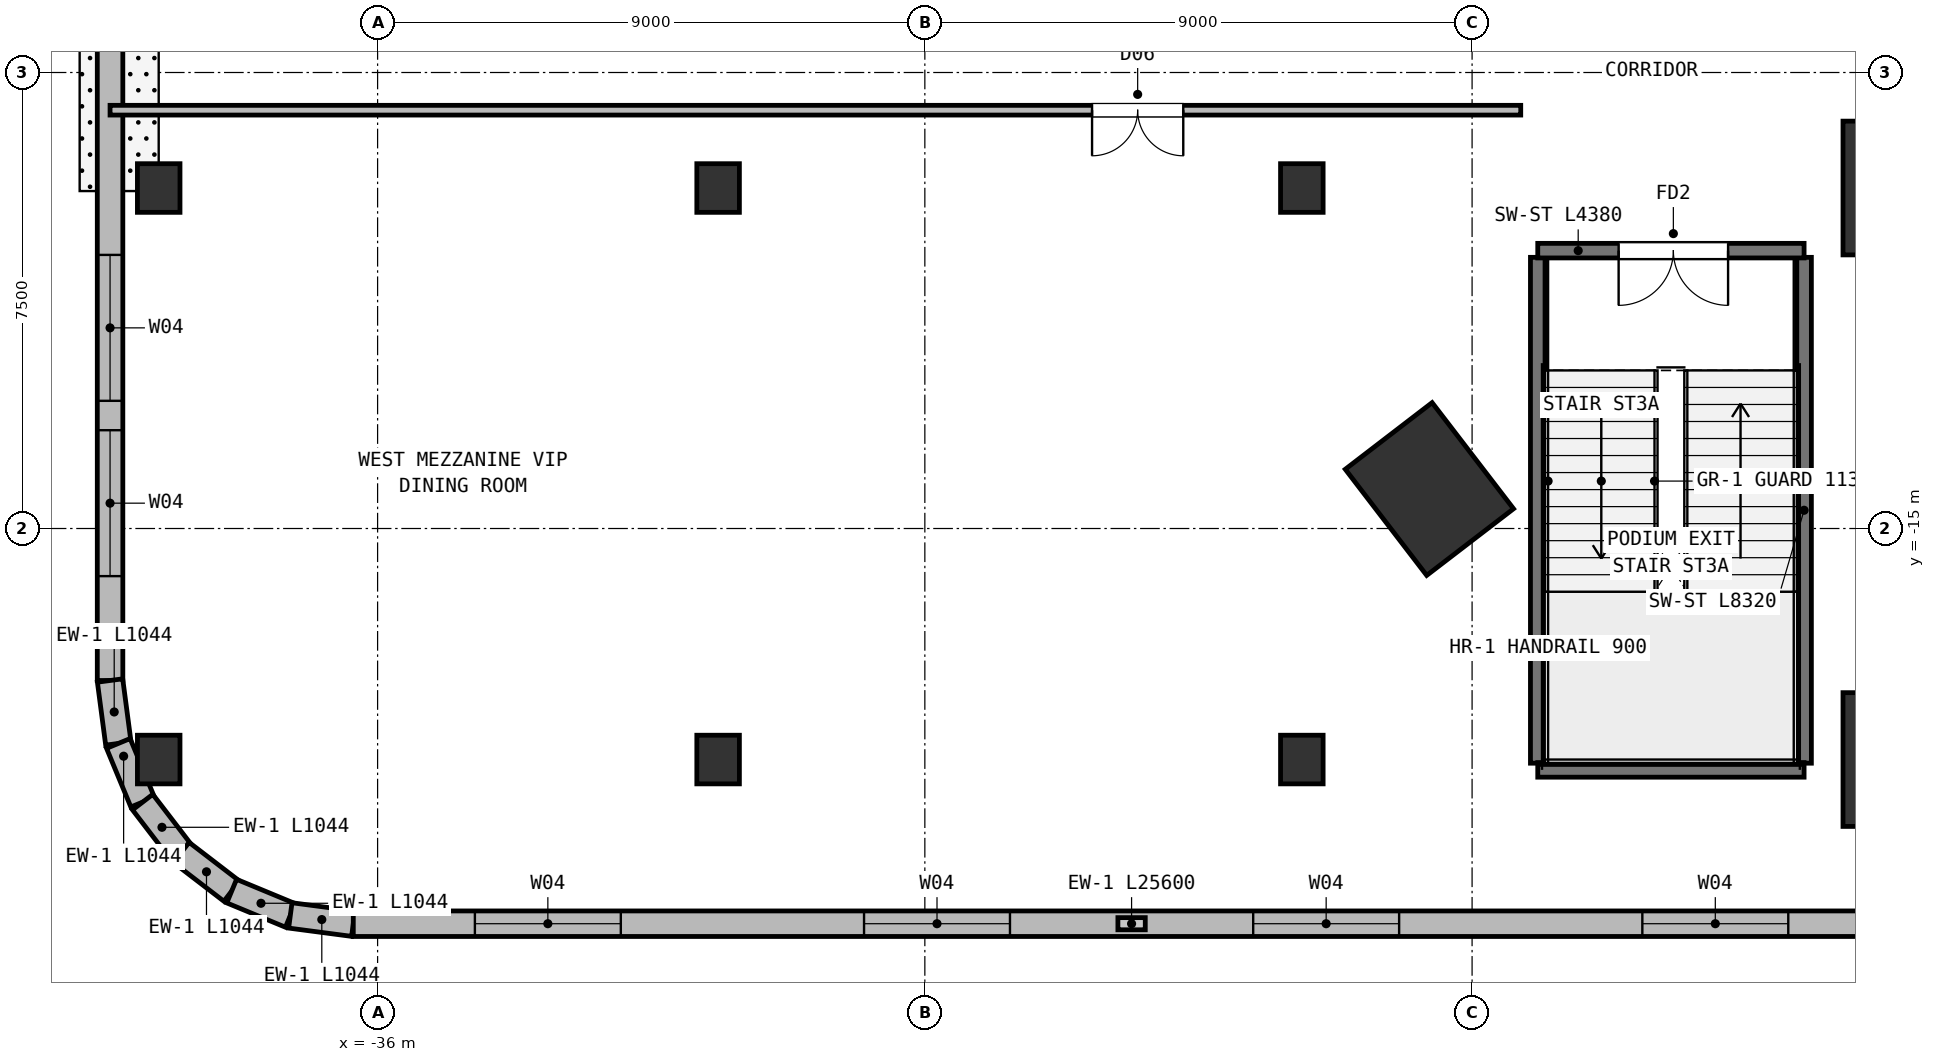
"""IFC4 building model, lengths in metres.
Left out: names, types, materials, properties, quantities, classifications, styles, units other than length and angle.
Written with IfcOpenShell. Run it as: python <this file> out.ifc"""

import sys

from ifc_helpers import new_model, si_unit, direction, frame, frame_2d, origin, origin_2d, place, context, subcontext, project, spatial, rectangle, extrude, element, fill, save


model = new_model("IFC4")
c1 = context("Model", 3, precision=1e-05, world=origin(), true_north=direction((0.0, 1.0)))
c2 = subcontext(c1, "Body", "Model", "MODEL_VIEW")
j1 = project(units=[si_unit("LENGTHUNIT", "METRE"), si_unit("PLANEANGLEUNIT", "RADIAN")], contexts=[c1])
p1 = place(None, origin())
s1 = spatial("IfcSite", under=j1, at=p1, CompositionType="ELEMENT")
p2 = place(p1, origin())
s2 = spatial("IfcBuilding", under=s1, at=p2, CompositionType="ELEMENT")
p3 = place(p2, frame((0.0, 0.0, 6.0)))
s3 = spatial("IfcBuildingStorey", under=s2, at=p3, CompositionType="ELEMENT", Elevation=6.0)
p4 = place(p3, frame((-18.702, -14.351, 0.0), z_axis=(0.0, 0.0, 1.0), x_axis=(0.793353340291, 0.608761429009, 0.0)))
e1 = element("IfcColumn", 1, at=p4, inside=s3, PredefinedType="COLUMN", context=c2, shape_type="SweptSolid", body=[
    extrude(rectangle(XDim=1.8, YDim=2.2, at=origin_2d()), origin(), (0.0, 0.0, 1.0), 5.0),
])
for number, where, z_axis, x_axis in (
    (2, (-39.6, -18.8, 0.0), (0.0, 0.0, 1.0), (1.0, 0.0, 0.0)),
    (3, (-39.6, -9.4, 0.0), (0.0, 0.0, 1.0), (1.0, 0.0, 0.0)),
    (4, (-30.4, -18.8, 0.0), (0.0, 0.0, 1.0), (1.0, 0.0, 0.0)),
    (5, (-30.4, -9.4, 0.0), (0.0, 0.0, 1.0), (1.0, 0.0, 0.0)),
    (6, (-20.8, -18.8, 0.0), (0.0, 0.0, 1.0), (1.0, 0.0, 0.0)),
    (7, (-20.8, -9.4, 0.0), (0.0, 0.0, 1.0), (1.0, 0.0, 0.0)),
):
    element("IfcColumn", number, at=place(p3, frame(where, z_axis=z_axis, x_axis=x_axis)), inside=s3, PredefinedType="COLUMN", context=c2, shape_type="SweptSolid", body=[
        extrude(rectangle(XDim=0.7, YDim=0.8, at=origin_2d()), origin(), (0.0, 0.0, 1.0), 5.0),
    ])
for number, where, z_axis, x_axis in (
    (8, (-11.0, -18.8, 0.0), (0.0, 0.0, 1.0), (1.0, 0.0, 0.0)),
    (9, (-11.0, -9.4, 0.0), (0.0, 0.0, 1.0), (1.0, 0.0, 0.0)),
):
    element("IfcColumn", number, at=place(p3, frame(where, z_axis=z_axis, x_axis=x_axis)), inside=s3, PredefinedType="COLUMN", context=c2, shape_type="SweptSolid", body=[
        extrude(rectangle(XDim=1.8, YDim=2.2, at=origin_2d()), origin(), (0.0, 0.0, 1.0), 5.0),
    ])
p5 = place(p3, frame((-40.4, -17.5, 0.0), z_axis=(0.0, 0.0, 1.0), x_axis=(0.0, 1.0, 0.0)))
e10 = element("IfcWall", 10, at=p5, inside=s3, PredefinedType="SOLIDWALL", context=c2, shape_type="SweptSolid", body=[
    extrude(rectangle(XDim=35.0, YDim=0.42, at=frame_2d((17.5, 0.0))), origin(), (0.0, 0.0, 1.0), 4.72),
])
p6 = place(p5, frame((1.717, 0.0, 0.95)))
e11 = element("IfcOpeningElement", 11, at=p6, cuts=e10, PredefinedType="OPENING", context=c2, shape_type="SweptSolid", body=[
    extrude(rectangle(XDim=2.4, YDim=2.6, at=frame_2d((1.2, 1.3))), frame((0.0, 0.22, 0.0), z_axis=(0.0, -1.0, 0.0), x_axis=(1.0, 0.0, 0.0)), (0.0, 0.0, 1.0), 0.44),
])
p7 = place(p5, frame((4.6, 0.0, 0.95)))
e12 = element("IfcOpeningElement", 12, at=p7, cuts=e10, PredefinedType="OPENING", context=c2, shape_type="SweptSolid", body=[
    extrude(rectangle(XDim=2.4, YDim=2.6, at=frame_2d((1.2, 1.3))), frame((0.0, 0.22, 0.0), z_axis=(0.0, -1.0, 0.0), x_axis=(1.0, 0.0, 0.0)), (0.0, 0.0, 1.0), 0.44),
])
p8 = place(p5, frame((13.383, 0.0, 0.95)))
e13 = element("IfcOpeningElement", 13, at=p8, cuts=e10, PredefinedType="OPENING", context=c2, shape_type="SweptSolid", body=[
    extrude(rectangle(XDim=2.4, YDim=2.6, at=frame_2d((1.2, 1.3))), frame((0.0, 0.22, 0.0), z_axis=(0.0, -1.0, 0.0), x_axis=(1.0, 0.0, 0.0)), (0.0, 0.0, 1.0), 0.44),
])
p9 = place(p5, frame((19.217, 0.0, 0.95)))
e14 = element("IfcOpeningElement", 14, at=p9, cuts=e10, PredefinedType="OPENING", context=c2, shape_type="SweptSolid", body=[
    extrude(rectangle(XDim=2.4, YDim=2.6, at=frame_2d((1.2, 1.3))), frame((0.0, 0.22, 0.0), z_axis=(0.0, -1.0, 0.0), x_axis=(1.0, 0.0, 0.0)), (0.0, 0.0, 1.0), 0.44),
])
p10 = place(p5, frame((28.0, 0.0, 0.95)))
e15 = element("IfcOpeningElement", 15, at=p10, cuts=e10, PredefinedType="OPENING", context=c2, shape_type="SweptSolid", body=[
    extrude(rectangle(XDim=2.4, YDim=2.6, at=frame_2d((1.2, 1.3))), frame((0.0, 0.22, 0.0), z_axis=(0.0, -1.0, 0.0), x_axis=(1.0, 0.0, 0.0)), (0.0, 0.0, 1.0), 0.44),
])
p11 = place(p5, frame((30.883, 0.0, 0.95)))
e16 = element("IfcOpeningElement", 16, at=p11, cuts=e10, PredefinedType="OPENING", context=c2, shape_type="SweptSolid", body=[
    extrude(rectangle(XDim=2.4, YDim=2.6, at=frame_2d((1.2, 1.3))), frame((0.0, 0.22, 0.0), z_axis=(0.0, -1.0, 0.0), x_axis=(1.0, 0.0, 0.0)), (0.0, 0.0, 1.0), 0.44),
])
p12 = place(p3, frame((-40.264, -18.535, 0.0), z_axis=(0.0, 0.0, 1.0), x_axis=(-0.130448465198, 0.991455091231, 0.0)))
e17 = element("IfcWall", 17, at=p12, inside=s3, PredefinedType="SOLIDWALL", context=c2, shape_type="SweptSolid", body=[
    extrude(rectangle(XDim=1.044, YDim=0.42, at=frame_2d((0.522, 0.0))), origin(), (0.0, 0.0, 1.0), 4.72),
])
p13 = place(p3, frame((-39.864, -19.5, 0.0), z_axis=(0.0, 0.0, 1.0), x_axis=(-0.382771688877, 0.923842970528, 0.0)))
e18 = element("IfcWall", 18, at=p13, inside=s3, PredefinedType="SOLIDWALL", context=c2, shape_type="SweptSolid", body=[
    extrude(rectangle(XDim=1.044, YDim=0.42, at=frame_2d((0.522, 0.0))), origin(), (0.0, 0.0, 1.0), 4.72),
])
p14 = place(p3, frame((-39.229, -20.328, 0.0), z_axis=(0.0, 0.0, 1.0), x_axis=(-0.608681879412, 0.793414374508, 0.0)))
e19 = element("IfcWall", 19, at=p14, inside=s3, PredefinedType="SOLIDWALL", context=c2, shape_type="SweptSolid", body=[
    extrude(rectangle(XDim=1.044, YDim=0.42, at=frame_2d((0.522, 0.0))), origin(), (0.0, 0.0, 1.0), 4.72),
])
p15 = place(p3, frame((-38.4, -20.964, 0.0), z_axis=(0.0, 0.0, 1.0), x_axis=(-0.793388088797, 0.608716141198, 0.0)))
e20 = element("IfcWall", 20, at=p15, inside=s3, PredefinedType="SOLIDWALL", context=c2, shape_type="SweptSolid", body=[
    extrude(rectangle(XDim=1.044, YDim=0.42, at=frame_2d((0.522, 0.0))), origin(), (0.0, 0.0, 1.0), 4.72),
])
p16 = place(p3, frame((-37.435, -21.364, 0.0), z_axis=(0.0, 0.0, 1.0), x_axis=(-0.923842970528, 0.382771688877, 0.0)))
e21 = element("IfcWall", 21, at=p16, inside=s3, PredefinedType="SOLIDWALL", context=c2, shape_type="SweptSolid", body=[
    extrude(rectangle(XDim=1.044, YDim=0.42, at=frame_2d((0.522, 0.0))), origin(), (0.0, 0.0, 1.0), 4.72),
])
p17 = place(p3, frame((-36.4, -21.5, 0.0), z_axis=(0.0, 0.0, 1.0), x_axis=(-0.991455091231, 0.130448465198, 0.0)))
e22 = element("IfcWall", 22, at=p17, inside=s3, PredefinedType="SOLIDWALL", context=c2, shape_type="SweptSolid", body=[
    extrude(rectangle(XDim=1.044, YDim=0.42, at=frame_2d((0.522, 0.0))), origin(), (0.0, 0.0, 1.0), 4.72),
])
p18 = place(p3, frame((-10.8, -21.5, 0.0), z_axis=(0.0, 0.0, 1.0), x_axis=(-1.0, 0.0, 0.0)))
e23 = element("IfcWall", 23, at=p18, inside=s3, PredefinedType="SOLIDWALL", context=c2, shape_type="SweptSolid", body=[
    extrude(rectangle(XDim=25.6, YDim=0.42, at=frame_2d((12.8, 0.0))), origin(), (0.0, 0.0, 1.0), 4.72),
])
p19 = place(p18, frame((2.0, 0.0, 0.95)))
e24 = element("IfcOpeningElement", 24, at=p19, cuts=e23, PredefinedType="OPENING", context=c2, shape_type="SweptSolid", body=[
    extrude(rectangle(XDim=2.4, YDim=2.6, at=frame_2d((1.2, 1.3))), frame((0.0, 0.22, 0.0), z_axis=(0.0, -1.0, 0.0), x_axis=(1.0, 0.0, 0.0)), (0.0, 0.0, 1.0), 0.44),
])
p20 = place(p18, frame((8.4, 0.0, 0.95)))
e25 = element("IfcOpeningElement", 25, at=p20, cuts=e23, PredefinedType="OPENING", context=c2, shape_type="SweptSolid", body=[
    extrude(rectangle(XDim=2.4, YDim=2.6, at=frame_2d((1.2, 1.3))), frame((0.0, 0.22, 0.0), z_axis=(0.0, -1.0, 0.0), x_axis=(1.0, 0.0, 0.0)), (0.0, 0.0, 1.0), 0.44),
])
p21 = place(p18, frame((14.8, 0.0, 0.95)))
e26 = element("IfcOpeningElement", 26, at=p21, cuts=e23, PredefinedType="OPENING", context=c2, shape_type="SweptSolid", body=[
    extrude(rectangle(XDim=2.4, YDim=2.6, at=frame_2d((1.2, 1.3))), frame((0.0, 0.22, 0.0), z_axis=(0.0, -1.0, 0.0), x_axis=(1.0, 0.0, 0.0)), (0.0, 0.0, 1.0), 0.44),
])
p22 = place(p18, frame((21.2, 0.0, 0.95)))
e27 = element("IfcOpeningElement", 27, at=p22, cuts=e23, PredefinedType="OPENING", context=c2, shape_type="SweptSolid", body=[
    extrude(rectangle(XDim=2.4, YDim=2.6, at=frame_2d((1.2, 1.3))), frame((0.0, 0.22, 0.0), z_axis=(0.0, -1.0, 0.0), x_axis=(1.0, 0.0, 0.0)), (0.0, 0.0, 1.0), 0.44),
])
for number, where, z_axis, x_axis in (
    (28, (-16.92, -18.86, 0.0), (0.0, 0.0, 1.0), (0.0, 1.0, 0.0)),
    (29, (-12.54, -18.86, 0.0), (0.0, 0.0, 1.0), (0.0, 1.0, 0.0)),
):
    element("IfcWall", number, at=place(p3, frame(where, z_axis=z_axis, x_axis=x_axis)), inside=s3, PredefinedType="SHEAR", context=c2, shape_type="SweptSolid", body=[
        extrude(rectangle(XDim=8.32, YDim=0.24, at=frame_2d((4.16, 0.0))), origin(), (0.0, 0.0, 1.0), 4.72),
    ])
p23 = place(p3, frame((-16.92, -18.97, 0.0), z_axis=(0.0, 0.0, 1.0), x_axis=(1.0, 0.0, 0.0)))
e30 = element("IfcWall", 30, at=p23, inside=s3, PredefinedType="SHEAR", context=c2, shape_type="SweptSolid", body=[
    extrude(rectangle(XDim=4.38, YDim=0.24, at=frame_2d((2.19, 0.0))), origin(), (0.0, 0.0, 1.0), 4.72),
])
p24 = place(p3, frame((-12.54, -10.43, 0.0), z_axis=(0.0, 0.0, 1.0), x_axis=(-1.0, 0.0, 0.0)))
e31 = element("IfcWall", 31, at=p24, inside=s3, PredefinedType="SHEAR", context=c2, shape_type="SweptSolid", body=[
    extrude(rectangle(XDim=4.38, YDim=0.24, at=frame_2d((2.19, 0.0))), origin(), (0.0, 0.0, 1.0), 4.72),
])
p25 = place(p24, frame((1.25, 0.0, 0.0)))
e32 = element("IfcOpeningElement", 32, at=p25, cuts=e31, PredefinedType="OPENING", context=c2, shape_type="SweptSolid", body=[
    extrude(rectangle(XDim=1.8, YDim=2.2, at=frame_2d((0.9, 1.1))), frame((0.0, 0.13, 0.0), z_axis=(0.0, -1.0, 0.0), x_axis=(1.0, 0.0, 0.0)), (0.0, 0.0, 1.0), 0.26),
])
p26 = place(p3, frame((-17.2, -8.12, 0.0), z_axis=(0.0, 0.0, 1.0), x_axis=(-1.0, 0.0, 0.0)))
e33 = element("IfcWall", 33, at=p26, inside=s3, PredefinedType="PARTITIONING", context=c2, shape_type="SweptSolid", body=[
    extrude(rectangle(XDim=23.2, YDim=0.16, at=frame_2d((11.6, 0.0))), origin(), (0.0, 0.0, 1.0), 4.72),
])
p27 = place(p26, frame((5.55, 0.0, 0.0)))
e34 = element("IfcOpeningElement", 34, at=p27, cuts=e33, PredefinedType="OPENING", context=c2, shape_type="SweptSolid", body=[
    extrude(rectangle(XDim=1.5, YDim=2.2, at=frame_2d((0.75, 1.1))), frame((0.0, 0.09, 0.0), z_axis=(0.0, -1.0, 0.0), x_axis=(1.0, 0.0, 0.0)), (0.0, 0.0, 1.0), 0.18),
])
p28 = place(p6, origin())
e35 = element("IfcWindow", 35, at=p28, inside=s3, PartitioningType="SINGLE_PANEL", PredefinedType="WINDOW", context=c2, shape_type="SweptSolid", body=[
    extrude(rectangle(XDim=2.4, YDim=2.6, at=frame_2d((1.2, 1.3))), frame((0.0, 0.03, 0.0), z_axis=(0.0, -1.0, 0.0), x_axis=(1.0, 0.0, 0.0)), (0.0, 0.0, 1.0), 0.06),
])
fill(e11, e35)
p29 = place(p7, origin())
e36 = element("IfcWindow", 36, at=p29, inside=s3, PartitioningType="SINGLE_PANEL", PredefinedType="WINDOW", context=c2, shape_type="SweptSolid", body=[
    extrude(rectangle(XDim=2.4, YDim=2.6, at=frame_2d((1.2, 1.3))), frame((0.0, 0.03, 0.0), z_axis=(0.0, -1.0, 0.0), x_axis=(1.0, 0.0, 0.0)), (0.0, 0.0, 1.0), 0.06),
])
fill(e12, e36)
p30 = place(p19, origin())
e37 = element("IfcWindow", 37, at=p30, inside=s3, PartitioningType="SINGLE_PANEL", PredefinedType="WINDOW", context=c2, shape_type="SweptSolid", body=[
    extrude(rectangle(XDim=2.4, YDim=2.6, at=frame_2d((1.2, 1.3))), frame((0.0, 0.03, 0.0), z_axis=(0.0, -1.0, 0.0), x_axis=(1.0, 0.0, 0.0)), (0.0, 0.0, 1.0), 0.06),
])
fill(e24, e37)
p31 = place(p20, origin())
e38 = element("IfcWindow", 38, at=p31, inside=s3, PartitioningType="SINGLE_PANEL", PredefinedType="WINDOW", context=c2, shape_type="SweptSolid", body=[
    extrude(rectangle(XDim=2.4, YDim=2.6, at=frame_2d((1.2, 1.3))), frame((0.0, 0.03, 0.0), z_axis=(0.0, -1.0, 0.0), x_axis=(1.0, 0.0, 0.0)), (0.0, 0.0, 1.0), 0.06),
])
fill(e25, e38)
p32 = place(p21, origin())
e39 = element("IfcWindow", 39, at=p32, inside=s3, PartitioningType="SINGLE_PANEL", PredefinedType="WINDOW", context=c2, shape_type="SweptSolid", body=[
    extrude(rectangle(XDim=2.4, YDim=2.6, at=frame_2d((1.2, 1.3))), frame((0.0, 0.03, 0.0), z_axis=(0.0, -1.0, 0.0), x_axis=(1.0, 0.0, 0.0)), (0.0, 0.0, 1.0), 0.06),
])
fill(e26, e39)
p33 = place(p22, origin())
e40 = element("IfcWindow", 40, at=p33, inside=s3, PartitioningType="SINGLE_PANEL", PredefinedType="WINDOW", context=c2, shape_type="SweptSolid", body=[
    extrude(rectangle(XDim=2.4, YDim=2.6, at=frame_2d((1.2, 1.3))), frame((0.0, 0.03, 0.0), z_axis=(0.0, -1.0, 0.0), x_axis=(1.0, 0.0, 0.0)), (0.0, 0.0, 1.0), 0.06),
])
fill(e27, e40)
p34 = place(p25, origin())
e41 = element("IfcDoor", 41, at=p34, inside=s3, OperationType="DOUBLE_DOOR_SINGLE_SWING", PredefinedType="DOOR", context=c2, shape_type="SweptSolid", body=[
    extrude(rectangle(XDim=1.8, YDim=2.2, at=frame_2d((0.9, 1.1))), frame((0.0, 0.025, 0.0), z_axis=(0.0, -1.0, 0.0), x_axis=(1.0, 0.0, 0.0)), (0.0, 0.0, 1.0), 0.05),
])
fill(e32, e41)
p35 = place(p27, origin())
e42 = element("IfcDoor", 42, at=p35, inside=s3, OperationType="DOUBLE_DOOR_SINGLE_SWING", PredefinedType="DOOR", context=c2, shape_type="SweptSolid", body=[
    extrude(rectangle(XDim=1.5, YDim=2.2, at=frame_2d((0.75, 1.1))), frame((0.0, 0.025, 0.0), z_axis=(0.0, -1.0, 0.0), x_axis=(1.0, 0.0, 0.0)), (0.0, 0.0, 1.0), 0.05),
])
fill(e34, e42)
save(model, sys.argv[1])
